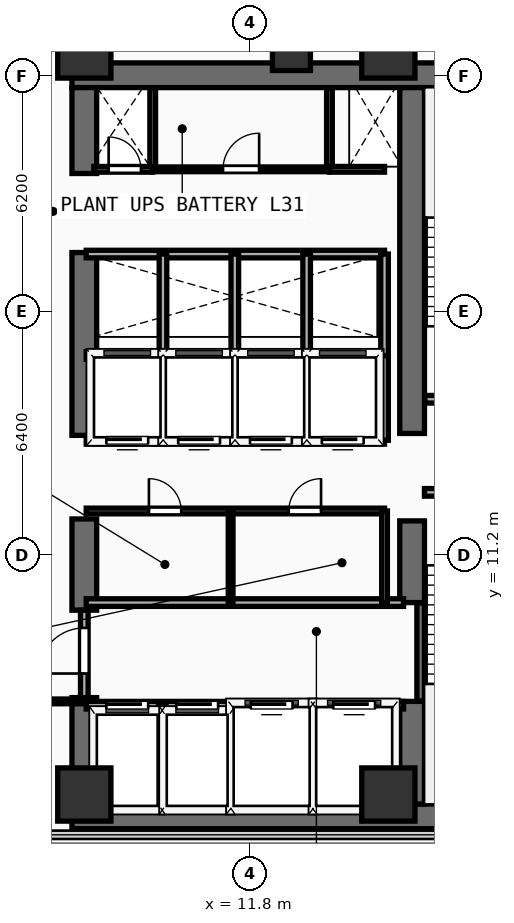
"""IFC4 building model, lengths in metres.
Left out: names, types, materials, properties, quantities, classifications, styles, units other than length and angle.
Written with IfcOpenShell. Run it as: python <this file> out.ifc"""

import sys

from ifc_helpers import new_model, si_unit, direction, frame, frame_2d, origin, origin_2d, place, context, subcontext, project, spatial, rectangle, extrude, element, fill, save


model = new_model("IFC4")
c1 = context("Model", 3, precision=1e-05, world=origin(), true_north=direction((0.0, 1.0)))
c2 = subcontext(c1, "Body", "Model", "MODEL_VIEW")
j1 = project(units=[si_unit("LENGTHUNIT", "METRE"), si_unit("PLANEANGLEUNIT", "RADIAN")], contexts=[c1])
p1 = place(None, origin())
s1 = spatial("IfcSite", under=j1, at=p1, CompositionType="ELEMENT")
p2 = place(p1, origin())
s2 = spatial("IfcBuilding", under=s1, at=p2, CompositionType="ELEMENT")
p3 = place(p2, frame((0.0, 0.0, 122.1)))
s3 = spatial("IfcBuildingStorey", under=s2, at=p3, CompositionType="ELEMENT", Elevation=122.1)
for number, where, z_axis, x_axis in (
    (1, (7.125, 4.325, 0.0), (0.0, 0.0, 1.0), (1.0, 0.0, 0.0)),
    (2, (7.125, 23.825, 0.0), (0.0, 0.0, 1.0), (1.0, 0.0, 0.0)),
):
    element("IfcWall", number, at=place(p3, frame(where, z_axis=z_axis, x_axis=x_axis)), inside=s3, PredefinedType="SHEAR", context=c2, shape_type="SweptSolid", body=[
        extrude(rectangle(XDim=14.0, YDim=0.65, at=frame_2d((7.0, 0.0))), origin(), (0.0, 0.0, 1.0), 3.54),
    ])
p4 = place(p3, frame((7.45, 4.65, 0.0), z_axis=(0.0, 0.0, 1.0), x_axis=(0.0, 1.0, 0.0)))
e3 = element("IfcWall", 3, at=p4, inside=s3, PredefinedType="SHEAR", context=c2, shape_type="SweptSolid", body=[
    extrude(rectangle(XDim=2.8, YDim=0.65, at=frame_2d((1.4, 0.0))), origin(), (0.0, 0.0, 1.0), 3.54),
])
p5 = place(p3, frame((7.45, 9.75, 0.0), z_axis=(0.0, 0.0, 1.0), x_axis=(0.0, 1.0, 0.0)))
e4 = element("IfcWall", 4, at=p5, inside=s3, PredefinedType="SHEAR", context=c2, shape_type="SweptSolid", body=[
    extrude(rectangle(XDim=2.4, YDim=0.65, at=frame_2d((1.2, 0.0))), origin(), (0.0, 0.0, 1.0), 3.54),
])
p6 = place(p3, frame((7.45, 14.35, 0.0), z_axis=(0.0, 0.0, 1.0), x_axis=(0.0, 1.0, 0.0)))
e5 = element("IfcWall", 5, at=p6, inside=s3, PredefinedType="SHEAR", context=c2, shape_type="SweptSolid", body=[
    extrude(rectangle(XDim=4.81, YDim=0.65, at=frame_2d((2.405, 0.0))), origin(), (0.0, 0.0, 1.0), 3.54),
])
p7 = place(p3, frame((7.45, 21.24, 0.0), z_axis=(0.0, 0.0, 1.0), x_axis=(0.0, 1.0, 0.0)))
e6 = element("IfcWall", 6, at=p7, inside=s3, PredefinedType="SHEAR", context=c2, shape_type="SweptSolid", body=[
    extrude(rectangle(XDim=2.26, YDim=0.65, at=frame_2d((1.13, 0.0))), origin(), (0.0, 0.0, 1.0), 3.54),
])
p8 = place(p3, frame((16.075, 4.65, 0.0), z_axis=(0.0, 0.0, 1.0), x_axis=(0.0, 1.0, 0.0)))
e7 = element("IfcWall", 7, at=p8, inside=s3, PredefinedType="SHEAR", context=c2, shape_type="SweptSolid", body=[
    extrude(rectangle(XDim=2.7, YDim=0.65, at=frame_2d((1.35, 0.0))), origin(), (0.0, 0.0, 1.0), 3.54),
])
p9 = place(p3, frame((16.075, 9.95, 0.0), z_axis=(0.0, 0.0, 1.0), x_axis=(0.0, 1.0, 0.0)))
e8 = element("IfcWall", 8, at=p9, inside=s3, PredefinedType="SHEAR", context=c2, shape_type="SweptSolid", body=[
    extrude(rectangle(XDim=2.15, YDim=0.65, at=frame_2d((1.075, 0.0))), origin(), (0.0, 0.0, 1.0), 3.54),
])
p10 = place(p3, frame((16.075, 14.4, 0.0), z_axis=(0.0, 0.0, 1.0), x_axis=(0.0, 1.0, 0.0)))
e9 = element("IfcWall", 9, at=p10, inside=s3, PredefinedType="SHEAR", context=c2, shape_type="SweptSolid", body=[
    extrude(rectangle(XDim=9.1, YDim=0.65, at=frame_2d((4.55, 0.0))), origin(), (0.0, 0.0, 1.0), 3.54),
])
for number, where, z_axis, x_axis in (
    (10, (7.45, 4.9, 0.0), (0.0, 0.0, 1.0), (1.0, 0.0, 0.0)),
    (11, (15.45, 4.9, 0.0), (0.0, 0.0, 1.0), (1.0, 0.0, 0.0)),
    (12, (7.45, 24.45, 0.0), (0.0, 0.0, 1.0), (1.0, 0.0, 0.0)),
    (13, (15.45, 24.45, 0.0), (0.0, 0.0, 1.0), (1.0, 0.0, 0.0)),
):
    element("IfcColumn", number, at=place(p3, frame(where, z_axis=z_axis, x_axis=x_axis)), inside=s3, PredefinedType="COLUMN", context=c2, shape_type="SweptSolid", body=[
        extrude(rectangle(XDim=1.4, YDim=1.4, at=origin_2d()), origin(), (0.0, 0.0, 1.0), 3.54),
    ])
p11 = place(p3, frame((12.9, 24.45, 0.0), z_axis=(0.0, 0.0, 1.0), x_axis=(1.0, 0.0, 0.0)))
e14 = element("IfcColumn", 14, at=p11, inside=s3, PredefinedType="COLUMN", context=c2, shape_type="SweptSolid", body=[
    extrude(rectangle(XDim=1.0, YDim=1.0, at=origin_2d()), origin(), (0.0, 0.0, 1.0), 3.54),
])
p12 = place(p3, frame((16.3, 7.36, 0.0), z_axis=(0.0, 0.0, 1.0), x_axis=(0.0, 1.0, 0.0)))
e15 = element("IfcWall", 15, at=p12, inside=s3, PredefinedType="SHEAR", context=c2, shape_type="SweptSolid", body=[
    extrude(rectangle(XDim=2.58, YDim=0.2, at=frame_2d((1.29, 0.0))), origin(), (0.0, 0.0, 1.0), 3.54),
])
p13 = place(p3, frame((16.4, 12.85, 0.0), z_axis=(0.0, 0.0, 1.0), x_axis=(1.0, 0.0, 0.0)))
e16 = element("IfcWall", 16, at=p13, inside=s3, PredefinedType="PARTITIONING", context=c2, shape_type="SweptSolid", body=[
    extrude(rectangle(XDim=3.96, YDim=0.2, at=frame_2d((1.98, 0.0))), origin(), (0.0, 0.0, 1.0), 3.54),
])
p14 = place(p13, frame((1.304, 0.0, 0.0)))
e17 = element("IfcOpeningElement", 17, at=p14, cuts=e16, PredefinedType="OPENING", context=c2, shape_type="SweptSolid", body=[
    extrude(rectangle(XDim=1.1, YDim=2.2, at=frame_2d((0.55, 1.1))), frame((0.0, 0.11, 0.0), z_axis=(0.0, -1.0, 0.0), x_axis=(1.0, 0.0, 0.0)), (0.0, 0.0, 1.0), 0.22),
])
p15 = place(p3, frame((16.41, 15.3, 0.0), z_axis=(0.0, 0.0, 1.0), x_axis=(1.0, 0.0, 0.0)))
e18 = element("IfcWall", 18, at=p15, inside=s3, PredefinedType="PARTITIONING", context=c2, shape_type="SweptSolid", body=[
    extrude(rectangle(XDim=3.95, YDim=0.2, at=frame_2d((1.975, 0.0))), origin(), (0.0, 0.0, 1.0), 3.54),
])
p16 = place(p15, frame((1.294, 0.0, 0.0)))
e19 = element("IfcOpeningElement", 19, at=p16, cuts=e18, PredefinedType="OPENING", context=c2, shape_type="SweptSolid", body=[
    extrude(rectangle(XDim=1.1, YDim=2.2, at=frame_2d((0.55, 1.1))), frame((0.0, 0.11, 0.0), z_axis=(0.0, -1.0, 0.0), x_axis=(1.0, 0.0, 0.0)), (0.0, 0.0, 1.0), 0.22),
])
p17 = place(p3, frame((7.5, 7.25, 0.0), z_axis=(0.0, 0.0, 1.0), x_axis=(1.0, 0.0, 0.0)))
e20 = element("IfcWall", 20, at=p17, inside=s3, PredefinedType="PARTITIONING", context=c2, shape_type="SweptSolid", body=[
    extrude(rectangle(XDim=8.35, YDim=0.2, at=frame_2d((4.175, 0.0))), origin(), (0.0, 0.0, 1.0), 3.54),
])
p18 = place(p17, frame((0.53, 0.0, 0.0)))
e21 = element("IfcOpeningElement", 21, at=p18, cuts=e20, PredefinedType="OPENING", context=c2, shape_type="SweptSolid", body=[
    extrude(rectangle(XDim=1.1, YDim=2.2, at=frame_2d((0.55, 1.1))), frame((0.0, 0.11, 0.0), z_axis=(0.0, -1.0, 0.0), x_axis=(1.0, 0.0, 0.0)), (0.0, 0.0, 1.0), 0.22),
])
p19 = place(p17, frame((2.37, 0.0, 0.0)))
e22 = element("IfcOpeningElement", 22, at=p19, cuts=e20, PredefinedType="OPENING", context=c2, shape_type="SweptSolid", body=[
    extrude(rectangle(XDim=1.1, YDim=2.2, at=frame_2d((0.55, 1.1))), frame((0.0, 0.11, 0.0), z_axis=(0.0, -1.0, 0.0), x_axis=(1.0, 0.0, 0.0)), (0.0, 0.0, 1.0), 0.22),
])
p20 = place(p17, frame((4.33, 0.0, 0.0)))
e23 = element("IfcOpeningElement", 23, at=p20, cuts=e20, PredefinedType="OPENING", context=c2, shape_type="SweptSolid", body=[
    extrude(rectangle(XDim=1.1, YDim=2.2, at=frame_2d((0.55, 1.1))), frame((0.0, 0.11, 0.0), z_axis=(0.0, -1.0, 0.0), x_axis=(1.0, 0.0, 0.0)), (0.0, 0.0, 1.0), 0.22),
])
p21 = place(p17, frame((6.5, 0.0, 0.0)))
e24 = element("IfcOpeningElement", 24, at=p21, cuts=e20, PredefinedType="OPENING", context=c2, shape_type="SweptSolid", body=[
    extrude(rectangle(XDim=1.1, YDim=2.2, at=frame_2d((0.55, 1.1))), frame((0.0, 0.11, 0.0), z_axis=(0.0, -1.0, 0.0), x_axis=(1.0, 0.0, 0.0)), (0.0, 0.0, 1.0), 0.22),
])
p22 = place(p3, frame((7.5, 9.95, 0.0), z_axis=(0.0, 0.0, 1.0), x_axis=(1.0, 0.0, 0.0)))
e25 = element("IfcWall", 25, at=p22, inside=s3, PredefinedType="PARTITIONING", context=c2, shape_type="SweptSolid", body=[
    extrude(rectangle(XDim=8.35, YDim=0.2, at=frame_2d((4.175, 0.0))), origin(), (0.0, 0.0, 1.0), 3.54),
])
for number, where, z_axis, x_axis in (
    (26, (9.5, 4.45, 0.0), (0.0, 0.0, 1.0), (0.0, 1.0, 0.0)),
    (27, (11.36, 4.45, 0.0), (0.0, 0.0, 1.0), (0.0, 1.0, 0.0)),
    (28, (13.46, 4.45, 0.0), (0.0, 0.0, 1.0), (0.0, 1.0, 0.0)),
):
    element("IfcWall", number, at=place(p3, frame(where, z_axis=z_axis, x_axis=x_axis)), inside=s3, PredefinedType="PARTITIONING", context=c2, shape_type="SweptSolid", body=[
        extrude(rectangle(XDim=2.8, YDim=0.2, at=frame_2d((1.4, 0.0))), origin(), (0.0, 0.0, 1.0), 3.54),
    ])
p23 = place(p3, frame((7.45, 7.45, 0.0), z_axis=(0.0, 0.0, 1.0), x_axis=(0.0, 1.0, 0.0)))
e29 = element("IfcWall", 29, at=p23, inside=s3, PredefinedType="PARTITIONING", context=c2, shape_type="SweptSolid", body=[
    extrude(rectangle(XDim=2.3, YDim=0.2, at=frame_2d((1.15, 0.0))), origin(), (0.0, 0.0, 1.0), 2.52),
])
p24 = place(p23, frame((0.633, 0.0, 0.0)))
e30 = element("IfcOpeningElement", 30, at=p24, cuts=e29, PredefinedType="OPENING", context=c2, shape_type="SweptSolid", body=[
    extrude(rectangle(XDim=1.2, YDim=2.25, at=frame_2d((0.6, 1.125))), frame((0.0, 0.11, 0.0), z_axis=(0.0, -1.0, 0.0), x_axis=(1.0, 0.0, 0.0)), (0.0, 0.0, 1.0), 0.22),
])
p25 = place(p3, frame((7.5, 12.36, 0.0), z_axis=(0.0, 0.0, 1.0), x_axis=(1.0, 0.0, 0.0)))
e31 = element("IfcWall", 31, at=p25, inside=s3, PredefinedType="PARTITIONING", context=c2, shape_type="SweptSolid", body=[
    extrude(rectangle(XDim=7.85, YDim=0.15, at=frame_2d((3.925, 0.0))), origin(), (0.0, 0.0, 1.0), 3.54),
])
p26 = place(p25, frame((1.65, 0.0, 0.0)))
e32 = element("IfcOpeningElement", 32, at=p26, cuts=e31, PredefinedType="OPENING", context=c2, shape_type="SweptSolid", body=[
    extrude(rectangle(XDim=0.85, YDim=2.15, at=frame_2d((0.425, 1.075))), frame((0.0, 0.085, 0.0), z_axis=(0.0, -1.0, 0.0), x_axis=(1.0, 0.0, 0.0)), (0.0, 0.0, 1.0), 0.17),
])
p27 = place(p25, frame((5.329, 0.0, 0.0)))
e33 = element("IfcOpeningElement", 33, at=p27, cuts=e31, PredefinedType="OPENING", context=c2, shape_type="SweptSolid", body=[
    extrude(rectangle(XDim=0.85, YDim=2.15, at=frame_2d((0.425, 1.075))), frame((0.0, 0.085, 0.0), z_axis=(0.0, -1.0, 0.0), x_axis=(1.0, 0.0, 0.0)), (0.0, 0.0, 1.0), 0.17),
])
p28 = place(p3, frame((15.35, 9.95, 0.0), z_axis=(0.0, 0.0, 1.0), x_axis=(0.0, 1.0, 0.0)))
e34 = element("IfcWall", 34, at=p28, inside=s3, PredefinedType="PARTITIONING", context=c2, shape_type="SweptSolid", body=[
    extrude(rectangle(XDim=2.41, YDim=0.15, at=frame_2d((1.205, 0.0))), origin(), (0.0, 0.0, 1.0), 3.54),
])
p29 = place(p3, frame((11.3, 9.95, 0.0), z_axis=(0.0, 0.0, 1.0), x_axis=(0.0, 1.0, 0.0)))
e35 = element("IfcWall", 35, at=p29, inside=s3, PredefinedType="PARTITIONING", context=c2, shape_type="SweptSolid", body=[
    extrude(rectangle(XDim=2.41, YDim=0.125, at=frame_2d((1.205, 0.0))), origin(), (0.0, 0.0, 1.0), 3.54),
])
p30 = place(p3, frame((7.5, 14.22, 0.0), z_axis=(0.0, 0.0, 1.0), x_axis=(1.0, 0.0, 0.0)))
e36 = element("IfcWall", 36, at=p30, inside=s3, PredefinedType="PARTITIONING", context=c2, shape_type="SweptSolid", body=[
    extrude(rectangle(XDim=7.85, YDim=0.2, at=frame_2d((3.925, 0.0))), origin(), (0.0, 0.0, 1.0), 3.54),
])
p31 = place(p30, frame((0.53, 0.0, 0.0)))
e37 = element("IfcOpeningElement", 37, at=p31, cuts=e36, PredefinedType="OPENING", context=c2, shape_type="SweptSolid", body=[
    extrude(rectangle(XDim=1.1, YDim=2.2, at=frame_2d((0.55, 1.1))), frame((0.0, 0.11, 0.0), z_axis=(0.0, -1.0, 0.0), x_axis=(1.0, 0.0, 0.0)), (0.0, 0.0, 1.0), 0.22),
])
p32 = place(p30, frame((2.42, 0.0, 0.0)))
e38 = element("IfcOpeningElement", 38, at=p32, cuts=e36, PredefinedType="OPENING", context=c2, shape_type="SweptSolid", body=[
    extrude(rectangle(XDim=1.1, YDim=2.2, at=frame_2d((0.55, 1.1))), frame((0.0, 0.11, 0.0), z_axis=(0.0, -1.0, 0.0), x_axis=(1.0, 0.0, 0.0)), (0.0, 0.0, 1.0), 0.22),
])
p33 = place(p30, frame((4.31, 0.0, 0.0)))
e39 = element("IfcOpeningElement", 39, at=p33, cuts=e36, PredefinedType="OPENING", context=c2, shape_type="SweptSolid", body=[
    extrude(rectangle(XDim=1.1, YDim=2.2, at=frame_2d((0.55, 1.1))), frame((0.0, 0.11, 0.0), z_axis=(0.0, -1.0, 0.0), x_axis=(1.0, 0.0, 0.0)), (0.0, 0.0, 1.0), 0.22),
])
p34 = place(p30, frame((6.2, 0.0, 0.0)))
e40 = element("IfcOpeningElement", 40, at=p34, cuts=e36, PredefinedType="OPENING", context=c2, shape_type="SweptSolid", body=[
    extrude(rectangle(XDim=1.1, YDim=2.2, at=frame_2d((0.55, 1.1))), frame((0.0, 0.11, 0.0), z_axis=(0.0, -1.0, 0.0), x_axis=(1.0, 0.0, 0.0)), (0.0, 0.0, 1.0), 0.22),
])
p35 = place(p3, frame((7.5, 16.45, 0.0), z_axis=(0.0, 0.0, 1.0), x_axis=(1.0, 0.0, 0.0)))
e41 = element("IfcWall", 41, at=p35, inside=s3, PredefinedType="PARTITIONING", context=c2, shape_type="SweptSolid", body=[
    extrude(rectangle(XDim=7.85, YDim=0.2, at=frame_2d((3.925, 0.0))), origin(), (0.0, 0.0, 1.0), 3.54),
])
for number, where, z_axis, x_axis in (
    (42, (15.35, 14.22, 0.0), (0.0, 0.0, 1.0), (0.0, 1.0, 0.0)),
    (43, (9.52, 14.22, 0.0), (0.0, 0.0, 1.0), (0.0, 1.0, 0.0)),
    (44, (11.41, 14.22, 0.0), (0.0, 0.0, 1.0), (0.0, 1.0, 0.0)),
    (45, (13.3, 14.22, 0.0), (0.0, 0.0, 1.0), (0.0, 1.0, 0.0)),
):
    element("IfcWall", number, at=place(p3, frame(where, z_axis=z_axis, x_axis=x_axis)), inside=s3, PredefinedType="PARTITIONING", context=c2, shape_type="SweptSolid", body=[
        extrude(rectangle(XDim=2.23, YDim=0.2, at=frame_2d((1.115, 0.0))), origin(), (0.0, 0.0, 1.0), 3.54),
    ])
p36 = place(p3, frame((7.5, 19.12, 0.0), z_axis=(0.0, 0.0, 1.0), x_axis=(1.0, 0.0, 0.0)))
e46 = element("IfcWall", 46, at=p36, inside=s3, PredefinedType="PARTITIONING", context=c2, shape_type="SweptSolid", body=[
    extrude(rectangle(XDim=7.85, YDim=0.2, at=frame_2d((3.925, 0.0))), origin(), (0.0, 0.0, 1.0), 3.54),
])
for number, where, z_axis, x_axis in (
    (47, (15.35, 16.45, 0.0), (0.0, 0.0, 1.0), (0.0, 1.0, 0.0)),
    (48, (9.52, 16.45, 0.0), (0.0, 0.0, 1.0), (0.0, 1.0, 0.0)),
    (49, (11.41, 16.45, 0.0), (0.0, 0.0, 1.0), (0.0, 1.0, 0.0)),
    (50, (13.3, 16.45, 0.0), (0.0, 0.0, 1.0), (0.0, 1.0, 0.0)),
):
    element("IfcWall", number, at=place(p3, frame(where, z_axis=z_axis, x_axis=x_axis)), inside=s3, PredefinedType="PARTITIONING", context=c2, shape_type="SweptSolid", body=[
        extrude(rectangle(XDim=2.67, YDim=0.2, at=frame_2d((1.335, 0.0))), origin(), (0.0, 0.0, 1.0), 3.54),
    ])
for number, where, z_axis, x_axis in (
    (51, (9.25, 21.35, 0.0), (0.0, 0.0, 1.0), (0.0, 1.0, 0.0)),
    (52, (13.9, 21.35, 0.0), (0.0, 0.0, 1.0), (0.0, 1.0, 0.0)),
):
    element("IfcWall", number, at=place(p3, frame(where, z_axis=z_axis, x_axis=x_axis)), inside=s3, PredefinedType="PARTITIONING", context=c2, shape_type="SweptSolid", body=[
        extrude(rectangle(XDim=2.13, YDim=0.15, at=frame_2d((1.065, 0.0))), origin(), (0.0, 0.0, 1.0), 3.54),
    ])
p37 = place(p3, frame((7.7, 21.35, 0.0), z_axis=(0.0, 0.0, 1.0), x_axis=(1.0, 0.0, 0.0)))
e53 = element("IfcWall", 53, at=p37, inside=s3, PredefinedType="PARTITIONING", context=c2, shape_type="SweptSolid", body=[
    extrude(rectangle(XDim=1.55, YDim=0.15, at=frame_2d((0.775, 0.0))), origin(), (0.0, 0.0, 1.0), 3.54),
])
p38 = place(p37, frame((0.39, 0.0, 0.0)))
e54 = element("IfcOpeningElement", 54, at=p38, cuts=e53, PredefinedType="OPENING", context=c2, shape_type="SweptSolid", body=[
    extrude(rectangle(XDim=0.85, YDim=2.15, at=frame_2d((0.425, 1.075))), frame((0.0, 0.085, 0.0), z_axis=(0.0, -1.0, 0.0), x_axis=(1.0, 0.0, 0.0)), (0.0, 0.0, 1.0), 0.17),
])
p39 = place(p3, frame((13.9, 21.35, 0.0), z_axis=(0.0, 0.0, 1.0), x_axis=(1.0, 0.0, 0.0)))
e55 = element("IfcWall", 55, at=p39, inside=s3, PredefinedType="PARTITIONING", context=c2, shape_type="SweptSolid", body=[
    extrude(rectangle(XDim=1.45, YDim=0.15, at=frame_2d((0.725, 0.0))), origin(), (0.0, 0.0, 1.0), 3.54),
])
p40 = place(p3, frame((9.25, 21.35, 0.0), z_axis=(0.0, 0.0, 1.0), x_axis=(1.0, 0.0, 0.0)))
e56 = element("IfcWall", 56, at=p40, inside=s3, PredefinedType="PARTITIONING", context=c2, shape_type="SweptSolid", body=[
    extrude(rectangle(XDim=4.65, YDim=0.125, at=frame_2d((2.325, 0.0))), origin(), (0.0, 0.0, 1.0), 3.54),
])
p41 = place(p40, frame((1.85, 0.0, 0.0)))
e57 = element("IfcOpeningElement", 57, at=p41, cuts=e56, PredefinedType="OPENING", context=c2, shape_type="SweptSolid", body=[
    extrude(rectangle(XDim=0.95, YDim=2.15, at=frame_2d((0.475, 1.075))), frame((0.0, 0.073, 0.0), z_axis=(0.0, -1.0, 0.0), x_axis=(1.0, 0.0, 0.0)), (0.0, 0.0, 1.0), 0.145),
])
p42 = place(p3, frame((1.64, 7.35, 0.0), z_axis=(0.0, 0.0, 1.0), x_axis=(1.0, 0.0, 0.0)))
e58 = element("IfcWall", 58, at=p42, inside=s3, PredefinedType="PARTITIONING", context=c2, shape_type="SweptSolid", body=[
    extrude(rectangle(XDim=5.76, YDim=0.125, at=frame_2d((2.88, 0.0))), origin(), (0.0, 0.0, 1.0), 3.54),
])
p43 = place(p42, frame((4.087, 0.0, 0.0)))
e59 = element("IfcOpeningElement", 59, at=p43, cuts=e58, PredefinedType="OPENING", context=c2, shape_type="SweptSolid", body=[
    extrude(rectangle(XDim=0.85, YDim=2.15, at=frame_2d((0.425, 1.075))), frame((0.0, 0.073, 0.0), z_axis=(0.0, -1.0, 0.0), x_axis=(1.0, 0.0, 0.0)), (0.0, 0.0, 1.0), 0.145),
])
p44 = place(p18, origin())
e60 = element("IfcDoor", 60, at=p44, inside=s3, OperationType="SLIDING_TO_LEFT", PredefinedType="DOOR", context=c2, shape_type="SweptSolid", body=[
    extrude(rectangle(XDim=1.1, YDim=2.2, at=frame_2d((0.55, 1.1))), frame((0.0, 0.025, 0.0), z_axis=(0.0, -1.0, 0.0), x_axis=(1.0, 0.0, 0.0)), (0.0, 0.0, 1.0), 0.05),
])
fill(e21, e60)
p45 = place(p19, origin())
e61 = element("IfcDoor", 61, at=p45, inside=s3, OperationType="SLIDING_TO_LEFT", PredefinedType="DOOR", context=c2, shape_type="SweptSolid", body=[
    extrude(rectangle(XDim=1.1, YDim=2.2, at=frame_2d((0.55, 1.1))), frame((0.0, 0.025, 0.0), z_axis=(0.0, -1.0, 0.0), x_axis=(1.0, 0.0, 0.0)), (0.0, 0.0, 1.0), 0.05),
])
fill(e22, e61)
p46 = place(p20, origin())
e62 = element("IfcDoor", 62, at=p46, inside=s3, OperationType="SLIDING_TO_LEFT", PredefinedType="DOOR", context=c2, shape_type="SweptSolid", body=[
    extrude(rectangle(XDim=1.1, YDim=2.2, at=frame_2d((0.55, 1.1))), frame((0.0, 0.025, 0.0), z_axis=(0.0, -1.0, 0.0), x_axis=(1.0, 0.0, 0.0)), (0.0, 0.0, 1.0), 0.05),
])
fill(e23, e62)
p47 = place(p21, origin())
e63 = element("IfcDoor", 63, at=p47, inside=s3, OperationType="SLIDING_TO_LEFT", PredefinedType="DOOR", context=c2, shape_type="SweptSolid", body=[
    extrude(rectangle(XDim=1.1, YDim=2.2, at=frame_2d((0.55, 1.1))), frame((0.0, 0.025, 0.0), z_axis=(0.0, -1.0, 0.0), x_axis=(1.0, 0.0, 0.0)), (0.0, 0.0, 1.0), 0.05),
])
fill(e24, e63)
p48 = place(p24, frame((1.2, 0.0, 0.0), z_axis=(0.0, 0.0, 1.0), x_axis=(-1.0, 0.0, 0.0)))
e64 = element("IfcDoor", 64, at=p48, inside=s3, OperationType="SINGLE_SWING_RIGHT", PredefinedType="DOOR", context=c2, shape_type="SweptSolid", body=[
    extrude(rectangle(XDim=1.2, YDim=2.25, at=frame_2d((0.6, 1.125))), frame((0.0, 0.025, 0.0), z_axis=(0.0, -1.0, 0.0), x_axis=(1.0, 0.0, 0.0)), (0.0, 0.0, 1.0), 0.05),
])
fill(e30, e64)
p49 = place(p26, origin())
e65 = element("IfcDoor", 65, at=p49, inside=s3, OperationType="SINGLE_SWING_LEFT", PredefinedType="DOOR", context=c2, shape_type="SweptSolid", body=[
    extrude(rectangle(XDim=0.85, YDim=2.15, at=frame_2d((0.425, 1.075))), frame((0.0, 0.025, 0.0), z_axis=(0.0, -1.0, 0.0), x_axis=(1.0, 0.0, 0.0)), (0.0, 0.0, 1.0), 0.05),
])
fill(e32, e65)
p50 = place(p27, origin())
e66 = element("IfcDoor", 66, at=p50, inside=s3, OperationType="SINGLE_SWING_RIGHT", PredefinedType="DOOR", context=c2, shape_type="SweptSolid", body=[
    extrude(rectangle(XDim=0.85, YDim=2.15, at=frame_2d((0.425, 1.075))), frame((0.0, 0.025, 0.0), z_axis=(0.0, -1.0, 0.0), x_axis=(1.0, 0.0, 0.0)), (0.0, 0.0, 1.0), 0.05),
])
fill(e33, e66)
p51 = place(p31, frame((1.1, 0.0, 0.0), z_axis=(0.0, 0.0, 1.0), x_axis=(-1.0, 0.0, 0.0)))
e67 = element("IfcDoor", 67, at=p51, inside=s3, OperationType="SLIDING_TO_LEFT", PredefinedType="DOOR", context=c2, shape_type="SweptSolid", body=[
    extrude(rectangle(XDim=1.1, YDim=2.2, at=frame_2d((0.55, 1.1))), frame((0.0, 0.025, 0.0), z_axis=(0.0, -1.0, 0.0), x_axis=(1.0, 0.0, 0.0)), (0.0, 0.0, 1.0), 0.05),
])
fill(e37, e67)
p52 = place(p32, frame((1.1, 0.0, 0.0), z_axis=(0.0, 0.0, 1.0), x_axis=(-1.0, 0.0, 0.0)))
e68 = element("IfcDoor", 68, at=p52, inside=s3, OperationType="SLIDING_TO_LEFT", PredefinedType="DOOR", context=c2, shape_type="SweptSolid", body=[
    extrude(rectangle(XDim=1.1, YDim=2.2, at=frame_2d((0.55, 1.1))), frame((0.0, 0.025, 0.0), z_axis=(0.0, -1.0, 0.0), x_axis=(1.0, 0.0, 0.0)), (0.0, 0.0, 1.0), 0.05),
])
fill(e38, e68)
p53 = place(p33, frame((1.1, 0.0, 0.0), z_axis=(0.0, 0.0, 1.0), x_axis=(-1.0, 0.0, 0.0)))
e69 = element("IfcDoor", 69, at=p53, inside=s3, OperationType="SLIDING_TO_LEFT", PredefinedType="DOOR", context=c2, shape_type="SweptSolid", body=[
    extrude(rectangle(XDim=1.1, YDim=2.2, at=frame_2d((0.55, 1.1))), frame((0.0, 0.025, 0.0), z_axis=(0.0, -1.0, 0.0), x_axis=(1.0, 0.0, 0.0)), (0.0, 0.0, 1.0), 0.05),
])
fill(e39, e69)
p54 = place(p34, frame((1.1, 0.0, 0.0), z_axis=(0.0, 0.0, 1.0), x_axis=(-1.0, 0.0, 0.0)))
e70 = element("IfcDoor", 70, at=p54, inside=s3, OperationType="SLIDING_TO_LEFT", PredefinedType="DOOR", context=c2, shape_type="SweptSolid", body=[
    extrude(rectangle(XDim=1.1, YDim=2.2, at=frame_2d((0.55, 1.1))), frame((0.0, 0.025, 0.0), z_axis=(0.0, -1.0, 0.0), x_axis=(1.0, 0.0, 0.0)), (0.0, 0.0, 1.0), 0.05),
])
fill(e40, e70)
p55 = place(p38, origin())
e71 = element("IfcDoor", 71, at=p55, inside=s3, OperationType="SINGLE_SWING_LEFT", PredefinedType="DOOR", context=c2, shape_type="SweptSolid", body=[
    extrude(rectangle(XDim=0.85, YDim=2.15, at=frame_2d((0.425, 1.075))), frame((0.0, 0.025, 0.0), z_axis=(0.0, -1.0, 0.0), x_axis=(1.0, 0.0, 0.0)), (0.0, 0.0, 1.0), 0.05),
])
fill(e54, e71)
p56 = place(p41, origin())
e72 = element("IfcDoor", 72, at=p56, inside=s3, OperationType="SINGLE_SWING_RIGHT", PredefinedType="DOOR", context=c2, shape_type="SweptSolid", body=[
    extrude(rectangle(XDim=0.95, YDim=2.15, at=frame_2d((0.475, 1.075))), frame((0.0, 0.025, 0.0), z_axis=(0.0, -1.0, 0.0), x_axis=(1.0, 0.0, 0.0)), (0.0, 0.0, 1.0), 0.05),
])
fill(e57, e72)
save(model, sys.argv[1])
